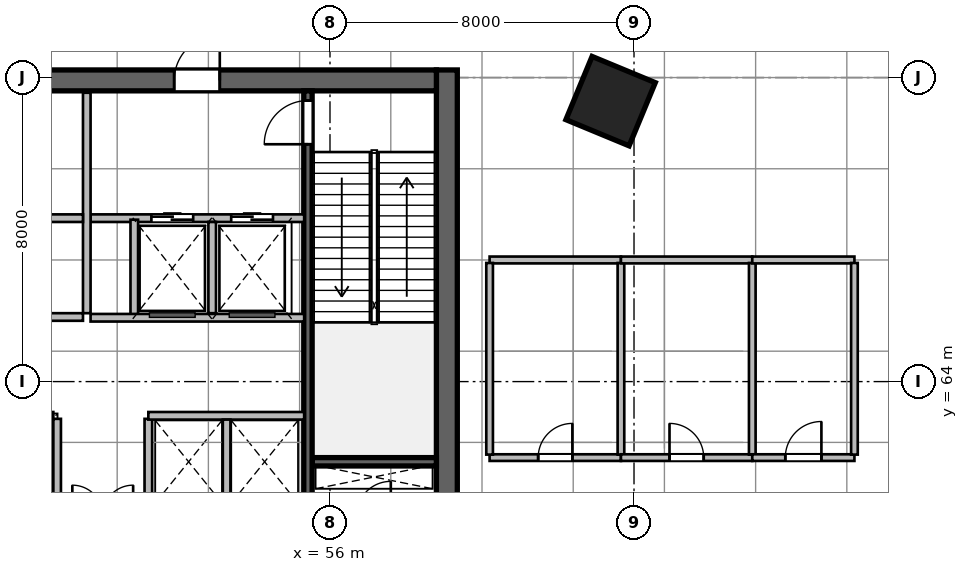
"""IFC4 building model, lengths in metres.
Left out: names, types, materials, properties, quantities, classifications, styles, units other than length and angle.
Written with IfcOpenShell. Run it as: python <this file> out.ifc"""

import sys

from ifc_helpers import new_model, si_unit, direction, frame, frame_2d, origin, origin_2d, place, context, subcontext, project, spatial, rectangle, extrude, source, transform, mapped, element, fill, save


model = new_model("IFC4")
c1 = context("Model", 3, precision=1e-05, world=origin(), true_north=direction((0.0, 1.0)))
c2 = subcontext(c1, "Body", "Model", "MODEL_VIEW")
j1 = project(units=[si_unit("LENGTHUNIT", "METRE"), si_unit("PLANEANGLEUNIT", "RADIAN")], contexts=[c1])
p1 = place(None, origin())
s1 = spatial("IfcSite", under=j1, at=p1, CompositionType="ELEMENT")
p2 = place(p1, origin())
s2 = spatial("IfcBuilding", under=s1, at=p2, CompositionType="ELEMENT")
p3 = place(p2, frame((0.0, 0.0, 12.0)))
s3 = spatial("IfcBuildingStorey", under=s2, at=p3, CompositionType="ELEMENT", Elevation=12.0)
m1 = source(origin(), c2, "Body", "SweptSolid", [
    extrude(rectangle(XDim=12.0, YDim=0.55, at=frame_2d((6.0, 0.0))), origin(), (0.0, 0.0, 1.0), 6.0),
])
p4 = place(p3, frame((59.075, 60.2, 0.0), z_axis=(0.0, 0.0, 1.0), x_axis=(0.0, 1.0, 0.0)))
e1 = element("IfcWall", 1, at=p4, inside=s3, PredefinedType="SHEAR", context=c2, shape_type="MappedRepresentation", body=[
    mapped(m1, transform((0.0, 0.0, 0.0), scale=1.0)),
])
m2 = source(origin(), c2, "Body", "SweptSolid", [
    extrude(rectangle(XDim=21.6, YDim=0.55, at=frame_2d((10.8, 0.0))), origin(), (0.0, 0.0, 1.0), 6.0),
])
p5 = place(p3, frame((37.2, 71.925, 0.0), z_axis=(0.0, 0.0, 1.0), x_axis=(1.0, 0.0, 0.0)))
e2 = element("IfcWall", 2, at=p5, inside=s3, PredefinedType="SHEAR", context=c2, shape_type="MappedRepresentation", body=[
    mapped(m2, transform((0.0, 0.0, 0.0), scale=1.0)),
])
p6 = place(p5, frame((1.2, 0.0, 0.0)))
e3 = element("IfcOpeningElement", 3, at=p6, cuts=e2, PredefinedType="OPENING", context=c2, shape_type="SweptSolid", body=[
    extrude(rectangle(XDim=0.9, YDim=2.1, at=frame_2d((0.45, 1.05))), frame((0.0, 0.285, 0.0), z_axis=(0.0, -1.0, 0.0), x_axis=(1.0, 0.0, 0.0)), (0.0, 0.0, 1.0), 0.57),
])
p7 = place(p5, frame((14.7, 0.0, 0.0)))
e4 = element("IfcOpeningElement", 4, at=p7, cuts=e2, PredefinedType="OPENING", context=c2, shape_type="SweptSolid", body=[
    extrude(rectangle(XDim=1.2, YDim=2.15, at=frame_2d((0.6, 1.075))), frame((0.0, 0.285, 0.0), z_axis=(0.0, -1.0, 0.0), x_axis=(1.0, 0.0, 0.0)), (0.0, 0.0, 1.0), 0.57),
])
p8 = place(p5, frame((4.15, 0.0, 0.0)))
e5 = element("IfcOpeningElement", 5, at=p8, cuts=e2, PredefinedType="OPENING", context=c2, shape_type="SweptSolid", body=[
    extrude(rectangle(XDim=1.3, YDim=2.15, at=frame_2d((0.65, 1.075))), frame((0.0, 0.285, 0.0), z_axis=(0.0, -1.0, 0.0), x_axis=(1.0, 0.0, 0.0)), (0.0, 0.0, 1.0), 0.57),
])
p9 = place(p5, frame((7.1, 0.0, 0.0)))
e6 = element("IfcOpeningElement", 6, at=p9, cuts=e2, PredefinedType="OPENING", context=c2, shape_type="SweptSolid", body=[
    extrude(rectangle(XDim=0.9, YDim=2.1, at=frame_2d((0.45, 1.05))), frame((0.0, 0.285, 0.0), z_axis=(0.0, -1.0, 0.0), x_axis=(1.0, 0.0, 0.0)), (0.0, 0.0, 1.0), 0.57),
])
m3 = source(origin(), c2, "Body", "SweptSolid", [
    extrude(rectangle(XDim=3.27, YDim=0.22, at=frame_2d((1.635, 0.0))), origin(), (0.0, 0.0, 1.0), 6.0),
])
p10 = place(p3, frame((55.53, 61.89, 0.0), z_axis=(0.0, 0.0, 1.0), x_axis=(1.0, 0.0, 0.0)))
e7 = element("IfcWall", 7, at=p10, inside=s3, PredefinedType="SHEAR", context=c2, shape_type="MappedRepresentation", body=[
    mapped(m3, transform((0.0, 0.0, 0.0), scale=1.0)),
])
m4 = source(origin(), c2, "Body", "SweptSolid", [
    extrude(rectangle(XDim=10.9, YDim=0.22, at=frame_2d((5.45, 0.0))), origin(), (0.0, 0.0, 1.0), 6.0),
])
p11 = place(p3, frame((55.42, 60.75, 0.0), z_axis=(0.0, 0.0, 1.0), x_axis=(0.0, 1.0, 0.0)))
e8 = element("IfcWall", 8, at=p11, inside=s3, PredefinedType="SHEAR", context=c2, shape_type="MappedRepresentation", body=[
    mapped(m4, transform((0.0, 0.0, 0.0), scale=1.0)),
])
p12 = place(p11, frame((9.495, 0.0, 0.0)))
e9 = element("IfcOpeningElement", 9, at=p12, cuts=e8, PredefinedType="OPENING", context=c2, shape_type="SweptSolid", body=[
    extrude(rectangle(XDim=1.15, YDim=2.15, at=frame_2d((0.575, 1.075))), frame((0.0, 0.12, 0.0), z_axis=(0.0, -1.0, 0.0), x_axis=(1.0, 0.0, 0.0)), (0.0, 0.0, 1.0), 0.24),
])
m5 = source(origin(), c2, "Body", "SweptSolid", [
    extrude(rectangle(XDim=1.8, YDim=1.8, at=origin_2d()), origin(), (0.0, 0.0, 1.0), 6.0),
])
p13 = place(p3, frame((63.384, 71.379, 0.0), z_axis=(0.0, 0.0, 1.0), x_axis=(0.382683432365, 0.923879532511, 0.0)))
e10 = element("IfcColumn", 10, at=p13, inside=s3, PredefinedType="COLUMN", context=c2, shape_type="MappedRepresentation", body=[
    mapped(m5, transform((0.0, 0.0, 0.0), scale=1.0)),
])
m6 = source(origin(), c2, "Body", "SweptSolid", [
    extrude(rectangle(XDim=5.667, YDim=0.35, at=frame_2d((2.833, 0.0))), origin(), (0.0, 0.0, 1.0), 5.7),
])
p14 = place(p3, frame((75.698, 72.147, 0.0), z_axis=(0.0, 0.0, 1.0), x_axis=(-0.873233089296, 0.487302751642, 0.0)))
e11 = element("IfcWall", 11, at=p14, inside=s3, PredefinedType="SOLIDWALL", context=c2, shape_type="MappedRepresentation", body=[
    mapped(m6, transform((0.0, 0.0, 0.0), scale=1.0)),
])
m7 = source(origin(), c2, "Body", "SweptSolid", [
    extrude(rectangle(XDim=2.24, YDim=0.2, at=frame_2d((1.12, 0.0))), origin(), (0.0, 0.0, 1.0), 5.7),
])
for number, where, z_axis, x_axis in (
    (12, (48.82, 60.78, 0.0), (0.0, 0.0, 1.0), (0.0, 1.0, 0.0)),
    (13, (51.22, 60.78, 0.0), (0.0, 0.0, 1.0), (0.0, 1.0, 0.0)),
):
    element("IfcWall", number, at=place(p3, frame(where, z_axis=z_axis, x_axis=x_axis)), inside=s3, PredefinedType="SOLIDWALL", context=c2, shape_type="MappedRepresentation", body=[
        mapped(m7, transform((0.0, 0.0, 0.0), scale=1.0)),
    ])
m8 = source(origin(), c2, "Body", "SweptSolid", [
    extrude(rectangle(XDim=5.62, YDim=0.2, at=frame_2d((2.81, 0.0))), origin(), (0.0, 0.0, 1.0), 5.7),
])
p15 = place(p3, frame((49.7, 68.3, 0.0), z_axis=(0.0, 0.0, 1.0), x_axis=(1.0, 0.0, 0.0)))
e14 = element("IfcWall", 14, at=p15, inside=s3, PredefinedType="SOLIDWALL", context=c2, shape_type="MappedRepresentation", body=[
    mapped(m8, transform((0.0, 0.0, 0.0), scale=1.0)),
])
p16 = place(p15, frame((1.6, 0.0, 0.0)))
e15 = element("IfcOpeningElement", 15, at=p16, cuts=e14, PredefinedType="OPENING", context=c2, shape_type="SweptSolid", body=[
    extrude(rectangle(XDim=1.1, YDim=2.15, at=frame_2d((0.55, 1.075))), frame((0.0, 0.11, 0.0), z_axis=(0.0, -1.0, 0.0), x_axis=(1.0, 0.0, 0.0)), (0.0, 0.0, 1.0), 0.22),
])
p17 = place(p15, frame((3.7, 0.0, 0.0)))
e16 = element("IfcOpeningElement", 16, at=p17, cuts=e14, PredefinedType="OPENING", context=c2, shape_type="SweptSolid", body=[
    extrude(rectangle(XDim=1.1, YDim=2.15, at=frame_2d((0.55, 1.075))), frame((0.0, 0.11, 0.0), z_axis=(0.0, -1.0, 0.0), x_axis=(1.0, 0.0, 0.0)), (0.0, 0.0, 1.0), 0.22),
])
m9 = source(origin(), c2, "Body", "SweptSolid", [
    extrude(rectangle(XDim=5.8, YDim=0.2, at=frame_2d((2.9, 0.0))), origin(), (0.0, 0.0, 1.0), 5.7),
])
p18 = place(p3, frame((49.6, 65.8, 0.0), z_axis=(0.0, 0.0, 1.0), x_axis=(0.0, 1.0, 0.0)))
e17 = element("IfcWall", 17, at=p18, inside=s3, PredefinedType="SOLIDWALL", context=c2, shape_type="MappedRepresentation", body=[
    mapped(m9, transform((0.0, 0.0, 0.0), scale=1.0)),
])
m10 = source(origin(), c2, "Body", "SweptSolid", [
    extrude(rectangle(XDim=2.58, YDim=0.2, at=frame_2d((1.29, 0.0))), origin(), (0.0, 0.0, 1.0), 5.7),
])
p19 = place(p3, frame((50.85, 65.68, 0.0), z_axis=(0.0, 0.0, 1.0), x_axis=(0.0, 1.0, 0.0)))
e18 = element("IfcWall", 18, at=p19, inside=s3, PredefinedType="SOLIDWALL", context=c2, shape_type="MappedRepresentation", body=[
    mapped(m10, transform((0.0, 0.0, 0.0), scale=1.0)),
])
m11 = source(origin(), c2, "Body", "SweptSolid", [
    extrude(rectangle(XDim=2.4, YDim=0.2, at=frame_2d((1.2, 0.0))), origin(), (0.0, 0.0, 1.0), 5.7),
])
p20 = place(p3, frame((52.9, 65.8, 0.0), z_axis=(0.0, 0.0, 1.0), x_axis=(0.0, 1.0, 0.0)))
e19 = element("IfcWall", 19, at=p20, inside=s3, PredefinedType="SOLIDWALL", context=c2, shape_type="MappedRepresentation", body=[
    mapped(m11, transform((0.0, 0.0, 0.0), scale=1.0)),
])
p21 = place(p3, frame((49.7, 65.68, 0.0), z_axis=(0.0, 0.0, 1.0), x_axis=(1.0, 0.0, 0.0)))
e20 = element("IfcWall", 20, at=p21, inside=s3, PredefinedType="SOLIDWALL", context=c2, shape_type="MappedRepresentation", body=[
    mapped(m8, transform((0.0, 0.0, 0.0), scale=1.0)),
])
m12 = source(origin(), c2, "Body", "SweptSolid", [
    extrude(rectangle(XDim=8.8, YDim=0.2, at=frame_2d((4.4, 0.0))), origin(), (0.0, 0.0, 1.0), 5.7),
])
p22 = place(p3, frame((40.7, 68.3, 0.0), z_axis=(0.0, 0.0, 1.0), x_axis=(1.0, 0.0, 0.0)))
e21 = element("IfcWall", 21, at=p22, inside=s3, PredefinedType="SOLIDWALL", context=c2, shape_type="MappedRepresentation", body=[
    mapped(m12, transform((0.0, 0.0, 0.0), scale=1.0)),
])
m13 = source(origin(), c2, "Body", "SweptSolid", [
    extrude(rectangle(XDim=8.02, YDim=0.2, at=frame_2d((4.01, 0.0))), origin(), (0.0, 0.0, 1.0), 5.7),
])
p23 = place(p3, frame((40.7, 63.1, 0.0), z_axis=(0.0, 0.0, 1.0), x_axis=(1.0, 0.0, 0.0)))
e22 = element("IfcWall", 22, at=p23, inside=s3, PredefinedType="SOLIDWALL", context=c2, shape_type="MappedRepresentation", body=[
    mapped(m13, transform((0.0, 0.0, 0.0), scale=1.0)),
])
p24 = place(p23, frame((0.72, 0.0, 0.0)))
e23 = element("IfcOpeningElement", 23, at=p24, cuts=e22, PredefinedType="OPENING", context=c2, shape_type="SweptSolid", body=[
    extrude(rectangle(XDim=1.0, YDim=2.15, at=frame_2d((0.5, 1.075))), frame((0.0, 0.11, 0.0), z_axis=(0.0, -1.0, 0.0), x_axis=(1.0, 0.0, 0.0)), (0.0, 0.0, 1.0), 0.22),
])
p25 = place(p23, frame((2.62, 0.0, 0.0)))
e24 = element("IfcOpeningElement", 24, at=p25, cuts=e22, PredefinedType="OPENING", context=c2, shape_type="SweptSolid", body=[
    extrude(rectangle(XDim=1.0, YDim=2.15, at=frame_2d((0.5, 1.075))), frame((0.0, 0.11, 0.0), z_axis=(0.0, -1.0, 0.0), x_axis=(1.0, 0.0, 0.0)), (0.0, 0.0, 1.0), 0.22),
])
p26 = place(p23, frame((4.55, 0.0, 0.0)))
e25 = element("IfcOpeningElement", 25, at=p26, cuts=e22, PredefinedType="OPENING", context=c2, shape_type="SweptSolid", body=[
    extrude(rectangle(XDim=1.0, YDim=2.15, at=frame_2d((0.5, 1.075))), frame((0.0, 0.11, 0.0), z_axis=(0.0, -1.0, 0.0), x_axis=(1.0, 0.0, 0.0)), (0.0, 0.0, 1.0), 0.22),
])
p27 = place(p23, frame((6.55, 0.0, 0.0)))
e26 = element("IfcOpeningElement", 26, at=p27, cuts=e22, PredefinedType="OPENING", context=c2, shape_type="SweptSolid", body=[
    extrude(rectangle(XDim=1.0, YDim=2.15, at=frame_2d((0.5, 1.075))), frame((0.0, 0.11, 0.0), z_axis=(0.0, -1.0, 0.0), x_axis=(1.0, 0.0, 0.0)), (0.0, 0.0, 1.0), 0.22),
])
m14 = source(origin(), c2, "Body", "SweptSolid", [
    extrude(rectangle(XDim=4.1, YDim=0.2, at=frame_2d((2.05, 0.0))), origin(), (0.0, 0.0, 1.0), 5.7),
])
p28 = place(p3, frame((51.22, 63.1, 0.0), z_axis=(0.0, 0.0, 1.0), x_axis=(1.0, 0.0, 0.0)))
e27 = element("IfcWall", 27, at=p28, inside=s3, PredefinedType="SOLIDWALL", context=c2, shape_type="MappedRepresentation", body=[
    mapped(m14, transform((0.0, 0.0, 0.0), scale=1.0)),
])
m15 = source(origin(), c2, "Body", "SweptSolid", [
    extrude(rectangle(XDim=2.2, YDim=0.2, at=frame_2d((1.1, 0.0))), origin(), (0.0, 0.0, 1.0), 5.7),
])
p29 = place(p3, frame((53.28, 60.8, 0.0), z_axis=(0.0, 0.0, 1.0), x_axis=(0.0, 1.0, 0.0)))
e28 = element("IfcWall", 28, at=p29, inside=s3, PredefinedType="SOLIDWALL", context=c2, shape_type="MappedRepresentation", body=[
    mapped(m15, transform((0.0, 0.0, 0.0), scale=1.0)),
])
p30 = place(p3, frame((40.7, 65.7, 0.0), z_axis=(0.0, 0.0, 1.0), x_axis=(1.0, 0.0, 0.0)))
e29 = element("IfcWall", 29, at=p30, inside=s3, PredefinedType="SOLIDWALL", context=c2, shape_type="MappedRepresentation", body=[
    mapped(m12, transform((0.0, 0.0, 0.0), scale=1.0)),
])
p31 = place(p30, frame((3.8, 0.0, 0.0)))
e30 = element("IfcOpeningElement", 30, at=p31, cuts=e29, PredefinedType="OPENING", context=c2, shape_type="SweptSolid", body=[
    extrude(rectangle(XDim=0.95, YDim=2.15, at=frame_2d((0.475, 1.075))), frame((0.0, 0.11, 0.0), z_axis=(0.0, -1.0, 0.0), x_axis=(1.0, 0.0, 0.0)), (0.0, 0.0, 1.0), 0.22),
])
m16 = source(origin(), c2, "Body", "SweptSolid", [
    extrude(rectangle(XDim=3.456, YDim=0.175, at=frame_2d((1.728, 0.0))), origin(), (0.0, 0.0, 1.0), 5.7),
])
p32 = place(p3, frame((60.2, 62.0, 0.0), z_axis=(0.0, 0.0, 1.0), x_axis=(1.0, 0.0, 0.0)))
e31 = element("IfcWall", 31, at=p32, inside=s3, PredefinedType="PARTITIONING", context=c2, shape_type="MappedRepresentation", body=[
    mapped(m16, transform((0.0, 0.0, 0.0), scale=1.0)),
])
p33 = place(p32, frame((1.278, 0.0, 0.0)))
e32 = element("IfcOpeningElement", 32, at=p33, cuts=e31, PredefinedType="OPENING", context=c2, shape_type="SweptSolid", body=[
    extrude(rectangle(XDim=0.9, YDim=2.08, at=frame_2d((0.45, 1.04))), frame((0.0, 0.098, 0.0), z_axis=(0.0, -1.0, 0.0), x_axis=(1.0, 0.0, 0.0)), (0.0, 0.0, 1.0), 0.195),
])
m17 = source(origin(), c2, "Body", "SweptSolid", [
    extrude(rectangle(XDim=3.456, YDim=0.18, at=frame_2d((1.728, 0.0))), origin(), (0.0, 0.0, 1.0), 5.7),
])
p34 = place(p3, frame((60.2, 67.2, 0.0), z_axis=(0.0, 0.0, 1.0), x_axis=(1.0, 0.0, 0.0)))
e33 = element("IfcWall", 33, at=p34, inside=s3, PredefinedType="PLUMBINGWALL", context=c2, shape_type="MappedRepresentation", body=[
    mapped(m17, transform((0.0, 0.0, 0.0), scale=1.0)),
])
m18 = source(origin(), c2, "Body", "SweptSolid", [
    extrude(rectangle(XDim=5.043, YDim=0.175, at=frame_2d((2.521, 0.0))), origin(), (0.0, 0.0, 1.0), 5.7),
])
for number, where, z_axis, x_axis in (
    (34, (60.2, 62.079, 0.0), (0.0, 0.0, 1.0), (0.0, 1.0, 0.0)),
    (35, (63.656, 62.079, 0.0), (0.0, 0.0, 1.0), (0.0, 1.0, 0.0)),
):
    element("IfcWall", number, at=place(p3, frame(where, z_axis=z_axis, x_axis=x_axis)), inside=s3, PredefinedType="PARTITIONING", context=c2, shape_type="MappedRepresentation", body=[
        mapped(m18, transform((0.0, 0.0, 0.0), scale=1.0)),
    ])
p35 = place(p3, frame((63.656, 62.0, 0.0), z_axis=(0.0, 0.0, 1.0), x_axis=(1.0, 0.0, 0.0)))
e36 = element("IfcWall", 36, at=p35, inside=s3, PredefinedType="PARTITIONING", context=c2, shape_type="MappedRepresentation", body=[
    mapped(m16, transform((0.0, 0.0, 0.0), scale=1.0)),
])
p36 = place(p35, frame((1.278, 0.0, 0.0)))
e37 = element("IfcOpeningElement", 37, at=p36, cuts=e36, PredefinedType="OPENING", context=c2, shape_type="SweptSolid", body=[
    extrude(rectangle(XDim=0.9, YDim=2.08, at=frame_2d((0.45, 1.04))), frame((0.0, 0.098, 0.0), z_axis=(0.0, -1.0, 0.0), x_axis=(1.0, 0.0, 0.0)), (0.0, 0.0, 1.0), 0.195),
])
p37 = place(p3, frame((63.656, 67.2, 0.0), z_axis=(0.0, 0.0, 1.0), x_axis=(1.0, 0.0, 0.0)))
e38 = element("IfcWall", 38, at=p37, inside=s3, PredefinedType="PLUMBINGWALL", context=c2, shape_type="MappedRepresentation", body=[
    mapped(m17, transform((0.0, 0.0, 0.0), scale=1.0)),
])
p38 = place(p3, frame((67.112, 62.079, 0.0), z_axis=(0.0, 0.0, 1.0), x_axis=(0.0, 1.0, 0.0)))
e39 = element("IfcWall", 39, at=p38, inside=s3, PredefinedType="PARTITIONING", context=c2, shape_type="MappedRepresentation", body=[
    mapped(m18, transform((0.0, 0.0, 0.0), scale=1.0)),
])
m19 = source(origin(), c2, "Body", "SweptSolid", [
    extrude(rectangle(XDim=2.688, YDim=0.175, at=frame_2d((1.344, 0.0))), origin(), (0.0, 0.0, 1.0), 5.7),
])
p39 = place(p3, frame((67.112, 62.0, 0.0), z_axis=(0.0, 0.0, 1.0), x_axis=(1.0, 0.0, 0.0)))
e40 = element("IfcWall", 40, at=p39, inside=s3, PredefinedType="PARTITIONING", context=c2, shape_type="MappedRepresentation", body=[
    mapped(m19, transform((0.0, 0.0, 0.0), scale=1.0)),
])
p40 = place(p39, frame((0.869, 0.0, 0.0)))
e41 = element("IfcOpeningElement", 41, at=p40, cuts=e40, PredefinedType="OPENING", context=c2, shape_type="SweptSolid", body=[
    extrude(rectangle(XDim=0.95, YDim=2.12, at=frame_2d((0.475, 1.06))), frame((0.0, 0.098, 0.0), z_axis=(0.0, -1.0, 0.0), x_axis=(1.0, 0.0, 0.0)), (0.0, 0.0, 1.0), 0.195),
])
m20 = source(origin(), c2, "Body", "SweptSolid", [
    extrude(rectangle(XDim=2.688, YDim=0.18, at=frame_2d((1.344, 0.0))), origin(), (0.0, 0.0, 1.0), 5.7),
])
p41 = place(p3, frame((67.112, 67.2, 0.0), z_axis=(0.0, 0.0, 1.0), x_axis=(1.0, 0.0, 0.0)))
e42 = element("IfcWall", 42, at=p41, inside=s3, PredefinedType="PLUMBINGWALL", context=c2, shape_type="MappedRepresentation", body=[
    mapped(m20, transform((0.0, 0.0, 0.0), scale=1.0)),
])
p42 = place(p3, frame((69.8, 62.079, 0.0), z_axis=(0.0, 0.0, 1.0), x_axis=(0.0, 1.0, 0.0)))
e43 = element("IfcWall", 43, at=p42, inside=s3, PredefinedType="PARTITIONING", context=c2, shape_type="MappedRepresentation", body=[
    mapped(m18, transform((0.0, 0.0, 0.0), scale=1.0)),
])
m21 = source(origin(), c2, "Body", "SweptSolid", [
    extrude(rectangle(XDim=1.15, YDim=2.15, at=frame_2d((0.575, 1.075))), frame((0.0, 0.025, 0.0), z_axis=(0.0, -1.0, 0.0), x_axis=(1.0, 0.0, 0.0)), (0.0, 0.0, 1.0), 0.05),
])
p43 = place(p12, origin())
e44 = element("IfcDoor", 44, at=p43, inside=s3, OperationType="SINGLE_SWING_LEFT", PredefinedType="DOOR", context=c2, shape_type="MappedRepresentation", body=[
    mapped(m21, transform((0.0, 0.0, 0.0), scale=1.0)),
])
fill(e9, e44)
m22 = source(origin(), c2, "Body", "SweptSolid", [
    extrude(rectangle(XDim=1.2, YDim=2.15, at=frame_2d((0.6, 1.075))), frame((0.0, 0.025, 0.0), z_axis=(0.0, -1.0, 0.0), x_axis=(1.0, 0.0, 0.0)), (0.0, 0.0, 1.0), 0.05),
])
p44 = place(p7, origin())
e45 = element("IfcDoor", 45, at=p44, inside=s3, OperationType="SINGLE_SWING_RIGHT", PredefinedType="DOOR", context=c2, shape_type="MappedRepresentation", body=[
    mapped(m22, transform((0.0, 0.0, 0.0), scale=1.0)),
])
fill(e4, e45)
m23 = source(origin(), c2, "Body", "SweptSolid", [
    extrude(rectangle(XDim=1.1, YDim=2.15, at=frame_2d((0.55, 1.075))), frame((0.0, 0.025, 0.0), z_axis=(0.0, -1.0, 0.0), x_axis=(1.0, 0.0, 0.0)), (0.0, 0.0, 1.0), 0.05),
])
p45 = place(p16, origin())
e46 = element("IfcDoor", 46, at=p45, inside=s3, OperationType="DOUBLE_DOOR_SLIDING", PredefinedType="DOOR", context=c2, shape_type="MappedRepresentation", body=[
    mapped(m23, transform((0.0, 0.0, 0.0), scale=1.0)),
])
fill(e15, e46)
p46 = place(p17, origin())
e47 = element("IfcDoor", 47, at=p46, inside=s3, OperationType="DOUBLE_DOOR_SLIDING", PredefinedType="DOOR", context=c2, shape_type="MappedRepresentation", body=[
    mapped(m23, transform((0.0, 0.0, 0.0), scale=1.0)),
])
fill(e16, e47)
m24 = source(origin(), c2, "Body", "SweptSolid", [
    extrude(rectangle(XDim=0.9, YDim=2.08, at=frame_2d((0.45, 1.04))), frame((0.0, 0.025, 0.0), z_axis=(0.0, -1.0, 0.0), x_axis=(1.0, 0.0, 0.0)), (0.0, 0.0, 1.0), 0.05),
])
p47 = place(p33, origin())
e48 = element("IfcDoor", 48, at=p47, inside=s3, OperationType="SINGLE_SWING_RIGHT", PredefinedType="DOOR", context=c2, shape_type="MappedRepresentation", body=[
    mapped(m24, transform((0.0, 0.0, 0.0), scale=1.0)),
])
fill(e32, e48)
p48 = place(p36, origin())
e49 = element("IfcDoor", 49, at=p48, inside=s3, OperationType="SINGLE_SWING_LEFT", PredefinedType="DOOR", context=c2, shape_type="MappedRepresentation", body=[
    mapped(m24, transform((0.0, 0.0, 0.0), scale=1.0)),
])
fill(e37, e49)
m25 = source(origin(), c2, "Body", "SweptSolid", [
    extrude(rectangle(XDim=0.95, YDim=2.12, at=frame_2d((0.475, 1.06))), frame((0.0, 0.025, 0.0), z_axis=(0.0, -1.0, 0.0), x_axis=(1.0, 0.0, 0.0)), (0.0, 0.0, 1.0), 0.05),
])
p49 = place(p40, origin())
e50 = element("IfcDoor", 50, at=p49, inside=s3, OperationType="SINGLE_SWING_RIGHT", PredefinedType="DOOR", context=c2, shape_type="MappedRepresentation", body=[
    mapped(m25, transform((0.0, 0.0, 0.0), scale=1.0)),
])
fill(e41, e50)
save(model, sys.argv[1])
